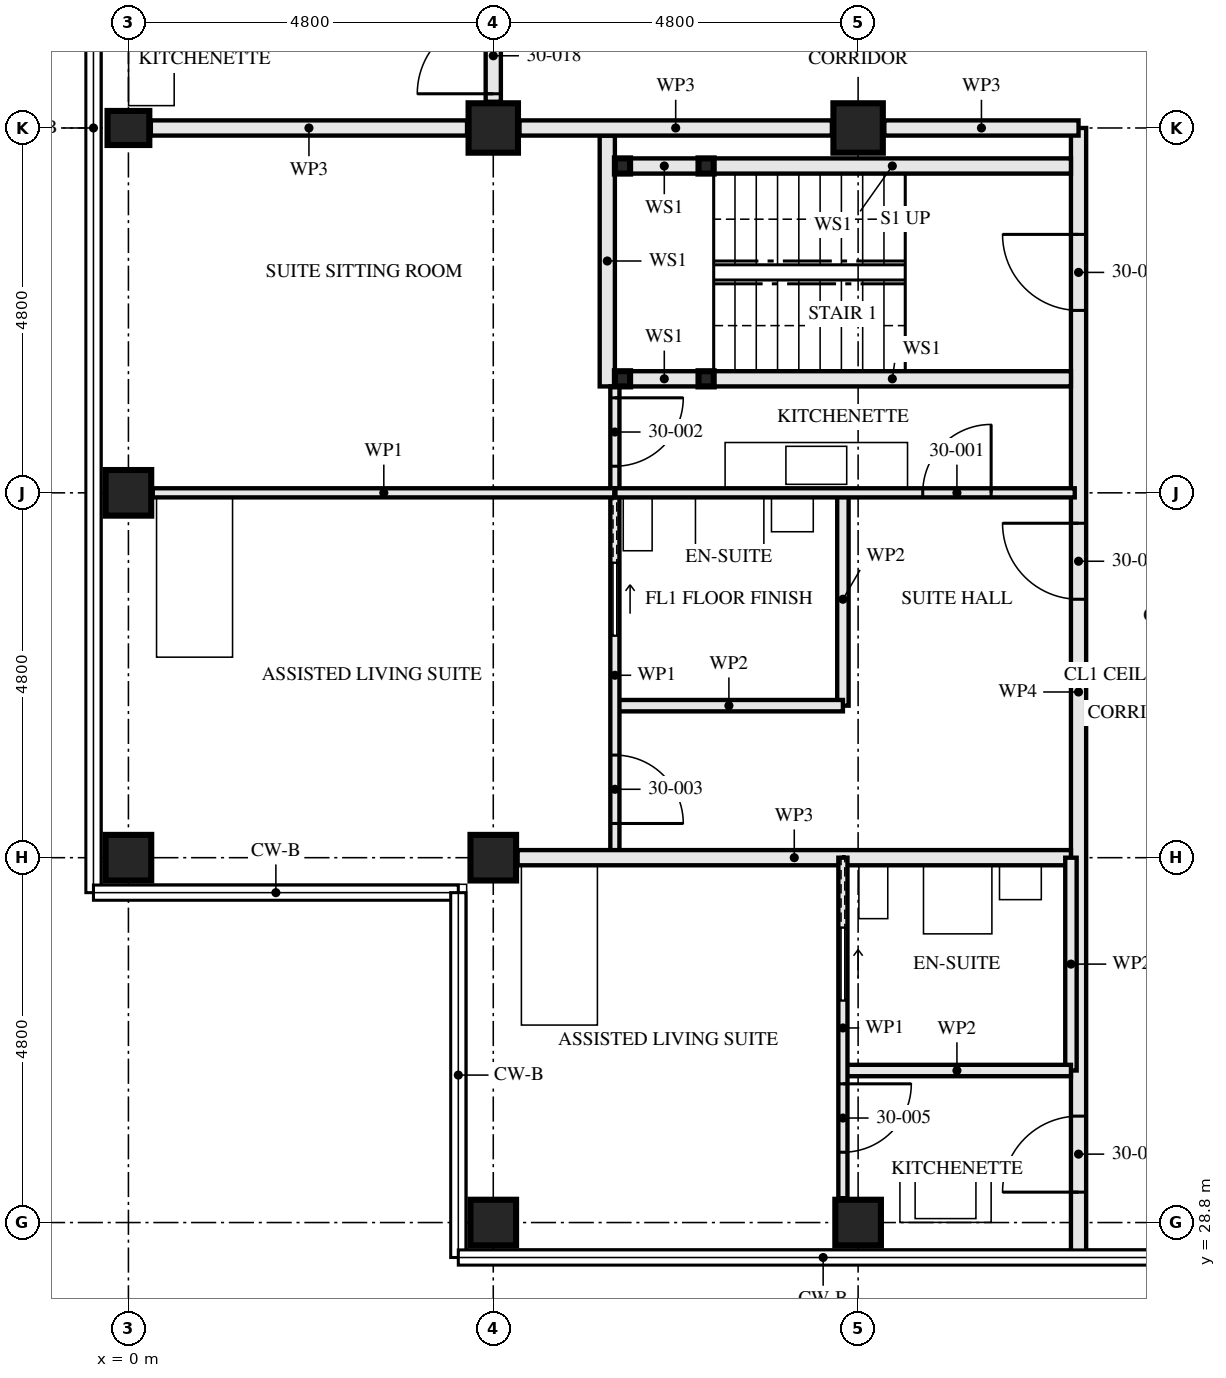
"""IFC4 building model, lengths in metres.
Left out: names, types, materials, properties, quantities, classifications, styles, units other than length and angle.
Written with IfcOpenShell. Run it as: python <this file> out.ifc"""

import sys

from ifc_helpers import new_model, si_unit, direction, frame, frame_2d, origin, origin_2d, place, context, subcontext, project, spatial, rectangle, hollow_rectangle, i_section, extrude, element, fill, save


model = new_model("IFC4")
c1 = context("Model", 3, precision=1e-05, world=origin(), true_north=direction((0.0, 1.0)))
c2 = subcontext(c1, "Body", "Model", "MODEL_VIEW")
j1 = project(units=[si_unit("LENGTHUNIT", "METRE"), si_unit("PLANEANGLEUNIT", "RADIAN")], contexts=[c1])
p1 = place(None, origin())
s1 = spatial("IfcSite", under=j1, at=p1, CompositionType="ELEMENT")
p2 = place(p1, origin())
s2 = spatial("IfcBuilding", under=s1, at=p2, CompositionType="ELEMENT")
p3 = place(p2, frame((0.0, 0.0, 112.0)))
s3 = spatial("IfcBuildingStorey", under=s2, at=p3, CompositionType="ELEMENT", Elevation=112.0)
for number, where, z_axis, x_axis in (
    (1, (0.0, 33.6, 0.0), (0.0, 0.0, 1.0), (0.0, 1.0, 0.0)),
    (2, (0.0, 38.4, 0.0), (0.0, 0.0, 1.0), (1.0, 0.0, 0.0)),
):
    element("IfcColumn", number, at=place(p3, frame(where, z_axis=z_axis, x_axis=x_axis)), inside=s3, PredefinedType="COLUMN", context=c2, shape_type="SweptSolid", body=[
        extrude(hollow_rectangle(XDim=0.6, YDim=0.6, WallThickness=0.08, at=origin_2d()), origin(), (0.0, 0.0, 1.0), 3.5),
    ])
p4 = place(p3, frame((0.0, 43.2, 0.0), z_axis=(0.0, 0.0, 1.0), x_axis=(0.0, 1.0, 0.0)))
e3 = element("IfcColumn", 3, at=p4, inside=s3, PredefinedType="COLUMN", context=c2, shape_type="SweptSolid", body=[
    extrude(i_section(OverallWidth=0.448, OverallDepth=0.55, WebThickness=0.072, FlangeThickness=0.115, FilletRadius=0.015, at=origin_2d()), origin(), (0.0, 0.0, 1.0), 3.5),
])
for number, where, z_axis, x_axis in (
    (4, (4.8, 28.8, 0.0), (0.0, 0.0, 1.0), (0.0, 1.0, 0.0)),
    (5, (4.8, 33.6, 0.0), (0.0, 0.0, 1.0), (0.0, 1.0, 0.0)),
):
    element("IfcColumn", number, at=place(p3, frame(where, z_axis=z_axis, x_axis=x_axis)), inside=s3, PredefinedType="COLUMN", context=c2, shape_type="SweptSolid", body=[
        extrude(hollow_rectangle(XDim=0.6, YDim=0.6, WallThickness=0.08, at=origin_2d()), origin(), (0.0, 0.0, 1.0), 3.5),
    ])
p5 = place(p3, frame((4.8, 43.2, 0.0), z_axis=(0.0, 0.0, 1.0), x_axis=(0.0, 1.0, 0.0)))
e6 = element("IfcColumn", 6, at=p5, inside=s3, PredefinedType="COLUMN", context=c2, shape_type="SweptSolid", body=[
    extrude(hollow_rectangle(XDim=0.65, YDim=0.65, WallThickness=0.05, at=origin_2d()), origin(), (0.0, 0.0, 1.0), 3.5),
])
p6 = place(p3, frame((9.6, 28.8, 0.0), z_axis=(0.0, 0.0, 1.0), x_axis=(0.0, 1.0, 0.0)))
e7 = element("IfcColumn", 7, at=p6, inside=s3, PredefinedType="COLUMN", context=c2, shape_type="SweptSolid", body=[
    extrude(hollow_rectangle(XDim=0.6, YDim=0.6, WallThickness=0.08, at=origin_2d()), origin(), (0.0, 0.0, 1.0), 3.5),
])
p7 = place(p3, frame((9.6, 43.2, 0.0), z_axis=(0.0, 0.0, 1.0), x_axis=(0.0, 1.0, 0.0)))
e8 = element("IfcColumn", 8, at=p7, inside=s3, PredefinedType="COLUMN", context=c2, shape_type="SweptSolid", body=[
    extrude(hollow_rectangle(XDim=0.65, YDim=0.65, WallThickness=0.05, at=origin_2d()), origin(), (0.0, 0.0, 1.0), 3.5),
])
for number, where, z_axis, x_axis in (
    (9, (6.5, 42.7, 0.0), (0.0, 0.0, 1.0), (1.0, 0.0, 0.0)),
    (10, (6.5, 39.9, 0.0), (0.0, 0.0, 1.0), (1.0, 0.0, 0.0)),
    (11, (7.6, 42.7, 0.0), (0.0, 0.0, 1.0), (1.0, 0.0, 0.0)),
    (12, (7.6, 39.9, 0.0), (0.0, 0.0, 1.0), (1.0, 0.0, 0.0)),
):
    element("IfcColumn", number, at=place(p3, frame(where, z_axis=z_axis, x_axis=x_axis)), inside=s3, PredefinedType="COLUMN", context=c2, shape_type="SweptSolid", body=[
        extrude(hollow_rectangle(XDim=0.2, YDim=0.2, WallThickness=0.008, at=origin_2d()), origin(), (0.0, 0.0, 1.0), 3.33),
    ])
p8 = place(p3, frame((6.6, 42.7, 0.0), z_axis=(0.0, 0.0, 1.0), x_axis=(1.0, 0.0, 0.0)))
e13 = element("IfcWall", 13, at=p8, inside=s3, PredefinedType="SOLIDWALL", context=c2, shape_type="SweptSolid", body=[
    extrude(rectangle(XDim=0.9, YDim=0.2, at=frame_2d((0.45, 0.0))), origin(), (0.0, 0.0, 1.0), 2.99),
])
p9 = place(p3, frame((7.7, 42.7, 0.0), z_axis=(0.0, 0.0, 1.0), x_axis=(1.0, 0.0, 0.0)))
e14 = element("IfcWall", 14, at=p9, inside=s3, PredefinedType="SOLIDWALL", context=c2, shape_type="SweptSolid", body=[
    extrude(rectangle(XDim=4.7, YDim=0.2, at=frame_2d((2.35, 0.0))), origin(), (0.0, 0.0, 1.0), 2.99),
])
p10 = place(p3, frame((6.6, 39.9, 0.0), z_axis=(0.0, 0.0, 1.0), x_axis=(1.0, 0.0, 0.0)))
e15 = element("IfcWall", 15, at=p10, inside=s3, PredefinedType="SOLIDWALL", context=c2, shape_type="SweptSolid", body=[
    extrude(rectangle(XDim=0.9, YDim=0.2, at=frame_2d((0.45, 0.0))), origin(), (0.0, 0.0, 1.0), 2.99),
])
p11 = place(p3, frame((7.7, 39.9, 0.0), z_axis=(0.0, 0.0, 1.0), x_axis=(1.0, 0.0, 0.0)))
e16 = element("IfcWall", 16, at=p11, inside=s3, PredefinedType="SOLIDWALL", context=c2, shape_type="SweptSolid", body=[
    extrude(rectangle(XDim=4.7, YDim=0.2, at=frame_2d((2.35, 0.0))), origin(), (0.0, 0.0, 1.0), 2.99),
])
p12 = place(p3, frame((6.3, 43.1, 0.0), z_axis=(0.0, 0.0, 1.0), x_axis=(0.0, -1.0, 0.0)))
e17 = element("IfcWall", 17, at=p12, inside=s3, PredefinedType="SOLIDWALL", context=c2, shape_type="SweptSolid", body=[
    extrude(rectangle(XDim=3.3, YDim=0.2, at=frame_2d((1.65, 0.0))), origin(), (0.0, 0.0, 1.0), 3.33),
])
p13 = place(p3, frame((6.4, 35.6, 0.0), z_axis=(0.0, 0.0, 1.0), x_axis=(1.0, 0.0, 0.0)))
e18 = element("IfcWall", 18, at=p13, inside=s3, PredefinedType="PARTITIONING", context=c2, shape_type="SweptSolid", body=[
    extrude(rectangle(XDim=3.0, YDim=0.15, at=frame_2d((1.5, 0.0))), origin(), (0.0, 0.0, 1.0), 3.33),
])
p14 = place(p3, frame((9.4, 38.4, 0.0), z_axis=(0.0, 0.0, 1.0), x_axis=(0.0, -1.0, 0.0)))
e19 = element("IfcWall", 19, at=p14, inside=s3, PredefinedType="PARTITIONING", context=c2, shape_type="SweptSolid", body=[
    extrude(rectangle(XDim=2.8, YDim=0.15, at=frame_2d((1.4, 0.0))), origin(), (0.0, 0.0, 1.0), 3.33),
])
p15 = place(p3, frame((6.4, 38.4, 0.0), z_axis=(0.0, 0.0, 1.0), x_axis=(1.0, 0.0, 0.0)))
e20 = element("IfcWall", 20, at=p15, inside=s3, PredefinedType="PARTITIONING", context=c2, shape_type="SweptSolid", body=[
    extrude(rectangle(XDim=6.05, YDim=0.12, at=frame_2d((3.025, 0.0))), origin(), (0.0, 0.0, 1.0), 2.55),
])
p16 = place(p15, frame((4.05, 0.0, 0.0)))
e21 = element("IfcOpeningElement", 21, at=p16, cuts=e20, PredefinedType="OPENING", context=c2, shape_type="SweptSolid", body=[
    extrude(rectangle(XDim=0.9, YDim=2.1, at=frame_2d((0.45, 1.05))), frame((0.0, 0.071, 0.0), z_axis=(0.0, -1.0, 0.0), x_axis=(1.0, 0.0, 0.0)), (0.0, 0.0, 1.0), 0.141),
])
p17 = place(p3, frame((6.4, 39.8, 0.0), z_axis=(0.0, 0.0, 1.0), x_axis=(0.0, -1.0, 0.0)))
e22 = element("IfcWall", 22, at=p17, inside=s3, PredefinedType="PARTITIONING", context=c2, shape_type="SweptSolid", body=[
    extrude(rectangle(XDim=1.4, YDim=0.12, at=frame_2d((0.7, 0.0))), origin(), (0.0, 0.0, 1.0), 3.33),
])
p18 = place(p17, frame((0.15, 0.0, 0.0)))
e23 = element("IfcOpeningElement", 23, at=p18, cuts=e22, PredefinedType="OPENING", context=c2, shape_type="SweptSolid", body=[
    extrude(rectangle(XDim=0.9, YDim=2.1, at=frame_2d((0.45, 1.05))), frame((0.0, 0.071, 0.0), z_axis=(0.0, -1.0, 0.0), x_axis=(1.0, 0.0, 0.0)), (0.0, 0.0, 1.0), 0.141),
])
p19 = place(p3, frame((6.4, 38.4, 0.0), z_axis=(0.0, 0.0, 1.0), x_axis=(0.0, -1.0, 0.0)))
e24 = element("IfcWall", 24, at=p19, inside=s3, PredefinedType="PARTITIONING", context=c2, shape_type="SweptSolid", body=[
    extrude(rectangle(XDim=4.8, YDim=0.12, at=frame_2d((2.4, 0.0))), origin(), (0.0, 0.0, 1.0), 3.33),
])
p20 = place(p19, frame((3.45, 0.0, 0.0)))
e25 = element("IfcOpeningElement", 25, at=p20, cuts=e24, PredefinedType="OPENING", context=c2, shape_type="SweptSolid", body=[
    extrude(rectangle(XDim=0.9, YDim=2.1, at=frame_2d((0.45, 1.05))), frame((0.0, 0.071, 0.0), z_axis=(0.0, -1.0, 0.0), x_axis=(1.0, 0.0, 0.0)), (0.0, 0.0, 1.0), 0.141),
])
p21 = place(p19, frame((0.925, 0.0, 0.0)))
e26 = element("IfcOpeningElement", 26, at=p21, cuts=e24, PredefinedType="OPENING", context=c2, shape_type="SweptSolid", body=[
    extrude(rectangle(XDim=0.95, YDim=2.1, at=frame_2d((0.475, 1.05))), frame((0.0, 0.071, 0.0), z_axis=(0.0, -1.0, 0.0), x_axis=(1.0, 0.0, 0.0)), (0.0, 0.0, 1.0), 0.141),
])
p22 = place(p3, frame((0.32, 38.4, 0.0), z_axis=(0.0, 0.0, 1.0), x_axis=(1.0, 0.0, 0.0)))
e27 = element("IfcWall", 27, at=p22, inside=s3, PredefinedType="PARTITIONING", context=c2, shape_type="SweptSolid", body=[
    extrude(rectangle(XDim=6.08, YDim=0.12, at=frame_2d((3.04, 0.0))), origin(), (0.0, 0.0, 1.0), 2.55),
])
p23 = place(p3, frame((5.12, 33.6, 0.0), z_axis=(0.0, 0.0, 1.0), x_axis=(1.0, 0.0, 0.0)))
e28 = element("IfcWall", 28, at=p23, inside=s3, PredefinedType="PARTITIONING", context=c2, shape_type="SweptSolid", body=[
    extrude(rectangle(XDim=7.28, YDim=0.2, at=frame_2d((3.64, 0.0))), origin(), (0.0, 0.0, 1.0), 2.55),
])
p24 = place(p3, frame((9.4, 30.8, 0.0), z_axis=(0.0, 0.0, 1.0), x_axis=(1.0, 0.0, 0.0)))
e29 = element("IfcWall", 29, at=p24, inside=s3, PredefinedType="PARTITIONING", context=c2, shape_type="SweptSolid", body=[
    extrude(rectangle(XDim=3.0, YDim=0.15, at=frame_2d((1.5, 0.0))), origin(), (0.0, 0.0, 1.0), 3.33),
])
p25 = place(p3, frame((12.4, 33.6, 0.0), z_axis=(0.0, 0.0, 1.0), x_axis=(0.0, -1.0, 0.0)))
e30 = element("IfcWall", 30, at=p25, inside=s3, PredefinedType="PARTITIONING", context=c2, shape_type="SweptSolid", body=[
    extrude(rectangle(XDim=2.8, YDim=0.15, at=frame_2d((1.4, 0.0))), origin(), (0.0, 0.0, 1.0), 3.33),
])
p26 = place(p3, frame((9.4, 33.6, 0.0), z_axis=(0.0, 0.0, 1.0), x_axis=(0.0, -1.0, 0.0)))
e31 = element("IfcWall", 31, at=p26, inside=s3, PredefinedType="PARTITIONING", context=c2, shape_type="SweptSolid", body=[
    extrude(rectangle(XDim=4.48, YDim=0.12, at=frame_2d((2.24, 0.0))), origin(), (0.0, 0.0, 1.0), 3.33),
])
p27 = place(p26, frame((2.975, 0.0, 0.0)))
e32 = element("IfcOpeningElement", 32, at=p27, cuts=e31, PredefinedType="OPENING", context=c2, shape_type="SweptSolid", body=[
    extrude(rectangle(XDim=0.9, YDim=2.1, at=frame_2d((0.45, 1.05))), frame((0.0, 0.071, 0.0), z_axis=(0.0, -1.0, 0.0), x_axis=(1.0, 0.0, 0.0)), (0.0, 0.0, 1.0), 0.141),
])
p28 = place(p26, frame((0.925, 0.0, 0.0)))
e33 = element("IfcOpeningElement", 33, at=p28, cuts=e31, PredefinedType="OPENING", context=c2, shape_type="SweptSolid", body=[
    extrude(rectangle(XDim=0.95, YDim=2.1, at=frame_2d((0.475, 1.05))), frame((0.0, 0.071, 0.0), z_axis=(0.0, -1.0, 0.0), x_axis=(1.0, 0.0, 0.0)), (0.0, 0.0, 1.0), 0.141),
])
p29 = place(p3, frame((12.5, 43.2, 0.0), z_axis=(0.0, 0.0, 1.0), x_axis=(0.0, -1.0, 0.0)))
e34 = element("IfcWall", 34, at=p29, inside=s3, PredefinedType="PARTITIONING", context=c2, shape_type="SweptSolid", body=[
    extrude(rectangle(XDim=14.84, YDim=0.2, at=frame_2d((7.42, 0.0))), origin(), (0.0, 0.0, 1.0), 2.32),
])
p30 = place(p29, frame((1.4, 0.0, 0.0)))
e35 = element("IfcOpeningElement", 35, at=p30, cuts=e34, PredefinedType="OPENING", context=c2, shape_type="SweptSolid", body=[
    extrude(rectangle(XDim=1.0, YDim=2.1, at=frame_2d((0.5, 1.05))), frame((0.0, 0.111, 0.0), z_axis=(0.0, -1.0, 0.0), x_axis=(1.0, 0.0, 0.0)), (0.0, 0.0, 1.0), 0.221),
])
p31 = place(p29, frame((5.2, 0.0, 0.0)))
e36 = element("IfcOpeningElement", 36, at=p31, cuts=e34, PredefinedType="OPENING", context=c2, shape_type="SweptSolid", body=[
    extrude(rectangle(XDim=1.0, YDim=2.1, at=frame_2d((0.5, 1.05))), frame((0.0, 0.111, 0.0), z_axis=(0.0, -1.0, 0.0), x_axis=(1.0, 0.0, 0.0)), (0.0, 0.0, 1.0), 0.221),
])
p32 = place(p29, frame((13.0, 0.0, 0.0)))
e37 = element("IfcOpeningElement", 37, at=p32, cuts=e34, PredefinedType="OPENING", context=c2, shape_type="SweptSolid", body=[
    extrude(rectangle(XDim=1.0, YDim=2.1, at=frame_2d((0.5, 1.05))), frame((0.0, 0.111, 0.0), z_axis=(0.0, -1.0, 0.0), x_axis=(1.0, 0.0, 0.0)), (0.0, 0.0, 1.0), 0.221),
])
p33 = place(p3, frame((4.8, 45.2, 0.0), z_axis=(0.0, 0.0, 1.0), x_axis=(0.0, -1.0, 0.0)))
e38 = element("IfcWall", 38, at=p33, inside=s3, PredefinedType="PARTITIONING", context=c2, shape_type="SweptSolid", body=[
    extrude(rectangle(XDim=1.655, YDim=0.2, at=frame_2d((0.828, 0.0))), origin(), (0.0, 0.0, 1.0), 3.33),
])
p34 = place(p33, frame((0.55, 0.0, 0.0)))
e39 = element("IfcOpeningElement", 39, at=p34, cuts=e38, PredefinedType="OPENING", context=c2, shape_type="SweptSolid", body=[
    extrude(rectangle(XDim=1.0, YDim=2.1, at=frame_2d((0.5, 1.05))), frame((0.0, 0.111, 0.0), z_axis=(0.0, -1.0, 0.0), x_axis=(1.0, 0.0, 0.0)), (0.0, 0.0, 1.0), 0.221),
])
p35 = place(p3, frame((12.5, 43.2, 0.0), z_axis=(0.0, 0.0, 1.0), x_axis=(-1.0, 0.0, 0.0)))
e40 = element("IfcWall", 40, at=p35, inside=s3, PredefinedType="PARTITIONING", context=c2, shape_type="SweptSolid", body=[
    extrude(rectangle(XDim=2.555, YDim=0.2, at=frame_2d((1.277, 0.0))), origin(), (0.0, 0.0, 1.0), 2.32),
])
p36 = place(p3, frame((9.255, 43.2, 0.0), z_axis=(0.0, 0.0, 1.0), x_axis=(-1.0, 0.0, 0.0)))
e41 = element("IfcWall", 41, at=p36, inside=s3, PredefinedType="PARTITIONING", context=c2, shape_type="SweptSolid", body=[
    extrude(rectangle(XDim=4.11, YDim=0.2, at=frame_2d((2.055, 0.0))), origin(), (0.0, 0.0, 1.0), 2.32),
])
p37 = place(p3, frame((4.455, 43.2, 0.0), z_axis=(0.0, 0.0, 1.0), x_axis=(-1.0, 0.0, 0.0)))
e42 = element("IfcWall", 42, at=p37, inside=s3, PredefinedType="PARTITIONING", context=c2, shape_type="SweptSolid", body=[
    extrude(rectangle(XDim=4.16, YDim=0.2, at=frame_2d((2.08, 0.0))), origin(), (0.0, 0.0, 1.0), 2.32),
])
p38 = place(p16, origin())
e43 = element("IfcDoor", 43, at=p38, inside=s3, OperationType="SINGLE_SWING_LEFT", PredefinedType="DOOR", context=c2, shape_type="SweptSolid", body=[
    extrude(rectangle(XDim=0.9, YDim=2.1, at=frame_2d((0.45, 1.05))), frame((0.0, 0.022, 0.0), z_axis=(0.0, -1.0, 0.0), x_axis=(1.0, 0.0, 0.0)), (0.0, 0.0, 1.0), 0.044),
])
fill(e21, e43)
p39 = place(p18, origin())
e44 = element("IfcDoor", 44, at=p39, inside=s3, OperationType="SINGLE_SWING_RIGHT", PredefinedType="DOOR", context=c2, shape_type="SweptSolid", body=[
    extrude(rectangle(XDim=0.9, YDim=2.1, at=frame_2d((0.45, 1.05))), frame((0.0, 0.022, 0.0), z_axis=(0.0, -1.0, 0.0), x_axis=(1.0, 0.0, 0.0)), (0.0, 0.0, 1.0), 0.044),
])
fill(e23, e44)
p40 = place(p20, origin())
e45 = element("IfcDoor", 45, at=p40, inside=s3, OperationType="SINGLE_SWING_LEFT", PredefinedType="DOOR", context=c2, shape_type="SweptSolid", body=[
    extrude(rectangle(XDim=0.9, YDim=2.1, at=frame_2d((0.45, 1.05))), frame((0.0, 0.022, 0.0), z_axis=(0.0, -1.0, 0.0), x_axis=(1.0, 0.0, 0.0)), (0.0, 0.0, 1.0), 0.044),
])
fill(e25, e45)
p41 = place(p21, origin())
e46 = element("IfcDoor", 46, at=p41, inside=s3, OperationType="SLIDING_TO_RIGHT", PredefinedType="DOOR", context=c2, shape_type="SweptSolid", body=[
    extrude(rectangle(XDim=0.95, YDim=2.1, at=frame_2d((0.475, 1.05))), frame((0.0, 0.022, 0.0), z_axis=(0.0, -1.0, 0.0), x_axis=(1.0, 0.0, 0.0)), (0.0, 0.0, 1.0), 0.044),
])
fill(e26, e46)
p42 = place(p27, origin())
e47 = element("IfcDoor", 47, at=p42, inside=s3, OperationType="SINGLE_SWING_RIGHT", PredefinedType="DOOR", context=c2, shape_type="SweptSolid", body=[
    extrude(rectangle(XDim=0.9, YDim=2.1, at=frame_2d((0.45, 1.05))), frame((0.0, 0.022, 0.0), z_axis=(0.0, -1.0, 0.0), x_axis=(1.0, 0.0, 0.0)), (0.0, 0.0, 1.0), 0.044),
])
fill(e32, e47)
p43 = place(p28, origin())
e48 = element("IfcDoor", 48, at=p43, inside=s3, OperationType="SLIDING_TO_RIGHT", PredefinedType="DOOR", context=c2, shape_type="SweptSolid", body=[
    extrude(rectangle(XDim=0.95, YDim=2.1, at=frame_2d((0.475, 1.05))), frame((0.0, 0.022, 0.0), z_axis=(0.0, -1.0, 0.0), x_axis=(1.0, 0.0, 0.0)), (0.0, 0.0, 1.0), 0.044),
])
fill(e33, e48)
p44 = place(p30, frame((1.0, 0.0, 0.0), z_axis=(0.0, 0.0, 1.0), x_axis=(-1.0, 0.0, 0.0)))
e49 = element("IfcDoor", 49, at=p44, inside=s3, OperationType="SINGLE_SWING_LEFT", PredefinedType="DOOR", context=c2, shape_type="SweptSolid", body=[
    extrude(rectangle(XDim=1.0, YDim=2.1, at=frame_2d((0.5, 1.05))), frame((0.0, 0.032, 0.0), z_axis=(0.0, -1.0, 0.0), x_axis=(1.0, 0.0, 0.0)), (0.0, 0.0, 1.0), 0.064),
])
fill(e35, e49)
p45 = place(p31, frame((1.0, 0.0, 0.0), z_axis=(0.0, 0.0, 1.0), x_axis=(-1.0, 0.0, 0.0)))
e50 = element("IfcDoor", 50, at=p45, inside=s3, OperationType="SINGLE_SWING_LEFT", PredefinedType="DOOR", context=c2, shape_type="SweptSolid", body=[
    extrude(rectangle(XDim=1.0, YDim=2.1, at=frame_2d((0.5, 1.05))), frame((0.0, 0.027, 0.0), z_axis=(0.0, -1.0, 0.0), x_axis=(1.0, 0.0, 0.0)), (0.0, 0.0, 1.0), 0.054),
])
fill(e36, e50)
p46 = place(p32, frame((1.0, 0.0, 0.0), z_axis=(0.0, 0.0, 1.0), x_axis=(-1.0, 0.0, 0.0)))
e51 = element("IfcDoor", 51, at=p46, inside=s3, OperationType="SINGLE_SWING_RIGHT", PredefinedType="DOOR", context=c2, shape_type="SweptSolid", body=[
    extrude(rectangle(XDim=1.0, YDim=2.1, at=frame_2d((0.5, 1.05))), frame((0.0, 0.027, 0.0), z_axis=(0.0, -1.0, 0.0), x_axis=(1.0, 0.0, 0.0)), (0.0, 0.0, 1.0), 0.054),
])
fill(e37, e51)
p47 = place(p34, frame((1.0, 0.0, 0.0), z_axis=(0.0, 0.0, 1.0), x_axis=(-1.0, 0.0, 0.0)))
e52 = element("IfcDoor", 52, at=p47, inside=s3, OperationType="SINGLE_SWING_RIGHT", PredefinedType="DOOR", context=c2, shape_type="SweptSolid", body=[
    extrude(rectangle(XDim=1.0, YDim=2.1, at=frame_2d((0.5, 1.05))), frame((0.0, 0.027, 0.0), z_axis=(0.0, -1.0, 0.0), x_axis=(1.0, 0.0, 0.0)), (0.0, 0.0, 1.0), 0.054),
])
fill(e39, e52)
save(model, sys.argv[1])
